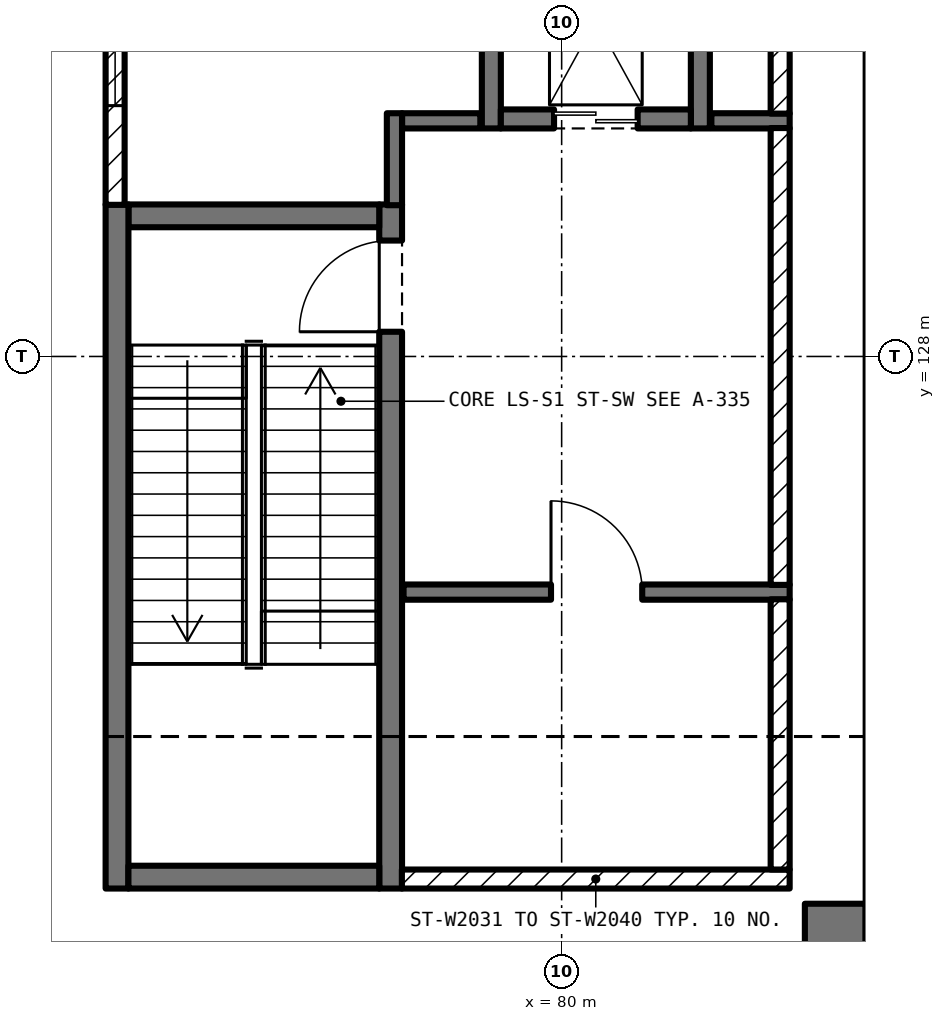
"""IFC4 building model, lengths in metres.
Left out: names, types, materials, properties, quantities, classifications, styles, units other than length and angle.
Written with IfcOpenShell. Run it as: python <this file> out.ifc"""

import sys

from ifc_helpers import new_model, si_unit, direction, frame, frame_2d, origin, place, context, subcontext, project, spatial, rectangle, extrude, element, fill, save


model = new_model("IFC4")
c1 = context("Model", 3, precision=1e-05, world=origin(), true_north=direction((0.0, 1.0)))
c2 = subcontext(c1, "Body", "Model", "MODEL_VIEW")
j1 = project(units=[si_unit("LENGTHUNIT", "METRE"), si_unit("PLANEANGLEUNIT", "RADIAN")], contexts=[c1])
p1 = place(None, origin())
s1 = spatial("IfcSite", under=j1, at=p1, CompositionType="ELEMENT")
p2 = place(p1, origin())
s2 = spatial("IfcBuilding", under=s1, at=p2, CompositionType="ELEMENT")
p3 = place(p2, frame((0.0, 0.0, 22.5)))
s3 = spatial("IfcBuildingStorey", under=s2, at=p3, CompositionType="ELEMENT", Elevation=22.5)
p4 = place(p3, frame((83.6, 95.2, 0.0), z_axis=(0.0, 0.0, 1.0), x_axis=(0.0, 1.0, 0.0)))
e1 = element("IfcWall", 1, at=p4, inside=s3, PredefinedType="SHEAR", context=c2, shape_type="SweptSolid", body=[
    extrude(rectangle(XDim=25.6, YDim=0.8, at=frame_2d((12.8, 0.0))), origin(), (0.0, 0.0, 1.0), 5.5),
])
p5 = place(p4, frame((1.1, 0.0, 2.6)))
e2 = element("IfcOpeningElement", 2, at=p5, cuts=e1, PredefinedType="OPENING", context=c2, shape_type="SweptSolid", body=[
    extrude(rectangle(XDim=2.4, YDim=1.2, at=frame_2d((1.2, 0.6))), frame((0.0, 0.412, 0.0), z_axis=(0.0, -1.0, 0.0), x_axis=(1.0, 0.0, 0.0)), (0.0, 0.0, 1.0), 0.824),
])
p6 = place(p4, frame((4.1, 0.0, 2.6)))
e3 = element("IfcOpeningElement", 3, at=p6, cuts=e1, PredefinedType="OPENING", context=c2, shape_type="SweptSolid", body=[
    extrude(rectangle(XDim=2.4, YDim=1.2, at=frame_2d((1.2, 0.6))), frame((0.0, 0.412, 0.0), z_axis=(0.0, -1.0, 0.0), x_axis=(1.0, 0.0, 0.0)), (0.0, 0.0, 1.0), 0.824),
])
p7 = place(p4, frame((7.1, 0.0, 2.6)))
e4 = element("IfcOpeningElement", 4, at=p7, cuts=e1, PredefinedType="OPENING", context=c2, shape_type="SweptSolid", body=[
    extrude(rectangle(XDim=2.4, YDim=1.2, at=frame_2d((1.2, 0.6))), frame((0.0, 0.412, 0.0), z_axis=(0.0, -1.0, 0.0), x_axis=(1.0, 0.0, 0.0)), (0.0, 0.0, 1.0), 0.824),
])
p8 = place(p4, frame((10.1, 0.0, 2.6)))
e5 = element("IfcOpeningElement", 5, at=p8, cuts=e1, PredefinedType="OPENING", context=c2, shape_type="SweptSolid", body=[
    extrude(rectangle(XDim=2.4, YDim=1.2, at=frame_2d((1.2, 0.6))), frame((0.0, 0.412, 0.0), z_axis=(0.0, -1.0, 0.0), x_axis=(1.0, 0.0, 0.0)), (0.0, 0.0, 1.0), 0.824),
])
p9 = place(p4, frame((13.1, 0.0, 2.6)))
e6 = element("IfcOpeningElement", 6, at=p9, cuts=e1, PredefinedType="OPENING", context=c2, shape_type="SweptSolid", body=[
    extrude(rectangle(XDim=2.4, YDim=1.2, at=frame_2d((1.2, 0.6))), frame((0.0, 0.412, 0.0), z_axis=(0.0, -1.0, 0.0), x_axis=(1.0, 0.0, 0.0)), (0.0, 0.0, 1.0), 0.824),
])
p10 = place(p4, frame((16.1, 0.0, 2.6)))
e7 = element("IfcOpeningElement", 7, at=p10, cuts=e1, PredefinedType="OPENING", context=c2, shape_type="SweptSolid", body=[
    extrude(rectangle(XDim=2.4, YDim=1.2, at=frame_2d((1.2, 0.6))), frame((0.0, 0.412, 0.0), z_axis=(0.0, -1.0, 0.0), x_axis=(1.0, 0.0, 0.0)), (0.0, 0.0, 1.0), 0.824),
])
p11 = place(p4, frame((19.1, 0.0, 2.6)))
e8 = element("IfcOpeningElement", 8, at=p11, cuts=e1, PredefinedType="OPENING", context=c2, shape_type="SweptSolid", body=[
    extrude(rectangle(XDim=2.4, YDim=1.2, at=frame_2d((1.2, 0.6))), frame((0.0, 0.412, 0.0), z_axis=(0.0, -1.0, 0.0), x_axis=(1.0, 0.0, 0.0)), (0.0, 0.0, 1.0), 0.824),
])
p12 = place(p4, frame((22.1, 0.0, 2.6)))
e9 = element("IfcOpeningElement", 9, at=p12, cuts=e1, PredefinedType="OPENING", context=c2, shape_type="SweptSolid", body=[
    extrude(rectangle(XDim=2.4, YDim=1.2, at=frame_2d((1.2, 0.6))), frame((0.0, 0.412, 0.0), z_axis=(0.0, -1.0, 0.0), x_axis=(1.0, 0.0, 0.0)), (0.0, 0.0, 1.0), 0.824),
])
p13 = place(p3, frame((77.75, 121.0, 0.0), z_axis=(0.0, 0.0, 1.0), x_axis=(0.0, 1.0, 0.0)))
e10 = element("IfcWall", 10, at=p13, inside=s3, PredefinedType="SOLIDWALL", context=c2, shape_type="SweptSolid", body=[
    extrude(rectangle(XDim=9.0, YDim=0.3, at=frame_2d((4.5, 0.0))), origin(), (0.0, 0.0, 1.0), 5.5),
])
p14 = place(p13, frame((7.325, 0.0, 0.0)))
e11 = element("IfcOpeningElement", 11, at=p14, cuts=e10, PredefinedType="OPENING", context=c2, shape_type="SweptSolid", body=[
    extrude(rectangle(XDim=1.2, YDim=2.1, at=frame_2d((0.6, 1.05))), frame((0.0, 0.162, 0.0), z_axis=(0.0, -1.0, 0.0), x_axis=(1.0, 0.0, 0.0)), (0.0, 0.0, 1.0), 0.324),
])
p15 = place(p3, frame((77.6, 129.85, 0.0), z_axis=(0.0, 0.0, 1.0), x_axis=(-1.0, 0.0, 0.0)))
e12 = element("IfcWall", 12, at=p15, inside=s3, PredefinedType="SOLIDWALL", context=c2, shape_type="SweptSolid", body=[
    extrude(rectangle(XDim=3.3, YDim=0.3, at=frame_2d((1.65, 0.0))), origin(), (0.0, 0.0, 1.0), 5.5),
])
p16 = place(p3, frame((74.15, 130.0, 0.0), z_axis=(0.0, 0.0, 1.0), x_axis=(0.0, -1.0, 0.0)))
e13 = element("IfcWall", 13, at=p16, inside=s3, PredefinedType="SOLIDWALL", context=c2, shape_type="SweptSolid", body=[
    extrude(rectangle(XDim=9.0, YDim=0.3, at=frame_2d((4.5, 0.0))), origin(), (0.0, 0.0, 1.0), 5.5),
])
p17 = place(p3, frame((74.3, 121.15, 0.0), z_axis=(0.0, 0.0, 1.0), x_axis=(1.0, 0.0, 0.0)))
e14 = element("IfcWall", 14, at=p17, inside=s3, PredefinedType="SOLIDWALL", context=c2, shape_type="SweptSolid", body=[
    extrude(rectangle(XDim=3.3, YDim=0.3, at=frame_2d((1.65, 0.0))), origin(), (0.0, 0.0, 1.0), 5.5),
])
for number, where, z_axis, x_axis in (
    (15, (81.825, 131.0, 0.0), (0.0, 0.0, 1.0), (0.0, 1.0, 0.0)),
    (16, (79.075, 135.0, 0.0), (0.0, 0.0, 1.0), (0.0, -1.0, 0.0)),
):
    element("IfcWall", number, at=place(p3, frame(where, z_axis=z_axis, x_axis=x_axis)), inside=s3, PredefinedType="SOLIDWALL", context=c2, shape_type="SweptSolid", body=[
        extrude(rectangle(XDim=4.0, YDim=0.25, at=frame_2d((2.0, 0.0))), origin(), (0.0, 0.0, 1.0), 5.5),
    ])
p18 = place(p3, frame((79.2, 131.125, 0.0), z_axis=(0.0, 0.0, 1.0), x_axis=(1.0, 0.0, 0.0)))
e17 = element("IfcWall", 17, at=p18, inside=s3, PredefinedType="SOLIDWALL", context=c2, shape_type="SweptSolid", body=[
    extrude(rectangle(XDim=2.5, YDim=0.25, at=frame_2d((1.25, 0.0))), origin(), (0.0, 0.0, 1.0), 5.5),
])
p19 = place(p18, frame((0.7, 0.0, 0.0)))
e18 = element("IfcOpeningElement", 18, at=p19, cuts=e17, PredefinedType="OPENING", context=c2, shape_type="SweptSolid", body=[
    extrude(rectangle(XDim=1.1, YDim=2.1, at=frame_2d((0.55, 1.05))), frame((0.0, 0.137, 0.0), z_axis=(0.0, -1.0, 0.0), x_axis=(1.0, 0.0, 0.0)), (0.0, 0.0, 1.0), 0.274),
])
for number, where, z_axis, x_axis in (
    (19, (83.0, 131.1, 0.0), (0.0, 0.0, 1.0), (-1.0, 0.0, 0.0)),
    (20, (78.93, 131.1, 0.0), (0.0, 0.0, 1.0), (-1.0, 0.0, 0.0)),
):
    element("IfcWall", number, at=place(p3, frame(where, z_axis=z_axis, x_axis=x_axis)), inside=s3, PredefinedType="PARTITIONING", context=c2, shape_type="SweptSolid", body=[
        extrude(rectangle(XDim=1.03, YDim=0.2, at=frame_2d((0.515, 0.0))), origin(), (0.0, 0.0, 1.0), 5.28),
    ])
p20 = place(p3, frame((77.8, 131.2, 0.0), z_axis=(0.0, 0.0, 1.0), x_axis=(0.0, -1.0, 0.0)))
e21 = element("IfcWall", 21, at=p20, inside=s3, PredefinedType="PARTITIONING", context=c2, shape_type="SweptSolid", body=[
    extrude(rectangle(XDim=1.21, YDim=0.2, at=frame_2d((0.605, 0.0))), origin(), (0.0, 0.0, 1.0), 5.28),
])
p21 = place(p3, frame((77.92, 124.9, 0.0), z_axis=(0.0, 0.0, 1.0), x_axis=(1.0, 0.0, 0.0)))
e22 = element("IfcWall", 22, at=p21, inside=s3, PredefinedType="PARTITIONING", context=c2, shape_type="SweptSolid", body=[
    extrude(rectangle(XDim=5.08, YDim=0.2, at=frame_2d((2.54, 0.0))), origin(), (0.0, 0.0, 1.0), 5.28),
])
p22 = place(p21, frame((1.94, 0.0, 0.0)))
e23 = element("IfcOpeningElement", 23, at=p22, cuts=e22, PredefinedType="OPENING", context=c2, shape_type="SweptSolid", body=[
    extrude(rectangle(XDim=1.2, YDim=2.1, at=frame_2d((0.6, 1.05))), frame((0.0, 0.112, 0.0), z_axis=(0.0, -1.0, 0.0), x_axis=(1.0, 0.0, 0.0)), (0.0, 0.0, 1.0), 0.224),
])
p23 = place(p3, frame((74.125, 134.75, 0.0), z_axis=(0.0, 0.0, 1.0), x_axis=(0.0, -1.0, 0.0)))
e24 = element("IfcWall", 24, at=p23, inside=s3, PredefinedType="SOLIDWALL", context=c2, shape_type="SweptSolid", body=[
    extrude(rectangle(XDim=4.755, YDim=0.25, at=frame_2d((2.377, 0.0))), origin(), (0.0, 0.0, 1.0), 5.28),
])
p24 = place(p23, frame((1.05, 0.0, 2.6)))
e25 = element("IfcOpeningElement", 25, at=p24, cuts=e24, PredefinedType="OPENING", context=c2, shape_type="SweptSolid", body=[
    extrude(rectangle(XDim=2.4, YDim=1.2, at=frame_2d((1.2, 0.6))), frame((0.0, 0.137, 0.0), z_axis=(0.0, -1.0, 0.0), x_axis=(1.0, 0.0, 0.0)), (0.0, 0.0, 1.0), 0.274),
])
p25 = place(p3, frame((77.898, 121.125, 0.0), z_axis=(0.0, 0.0, 1.0), x_axis=(1.0, 0.0, 0.0)))
e26 = element("IfcWall", 26, at=p25, inside=s3, PredefinedType="SOLIDWALL", context=c2, shape_type="SweptSolid", body=[
    extrude(rectangle(XDim=5.102, YDim=0.25, at=frame_2d((2.551, 0.0))), origin(), (0.0, 0.0, 1.0), 5.28),
])
p26 = place(p3, frame((82.875, 121.25, 0.0), z_axis=(0.0, 0.0, 1.0), x_axis=(0.0, 1.0, 0.0)))
e27 = element("IfcWall", 27, at=p26, inside=s3, PredefinedType="SOLIDWALL", context=c2, shape_type="SweptSolid", body=[
    extrude(rectangle(XDim=3.555, YDim=0.25, at=frame_2d((1.777, 0.0))), origin(), (0.0, 0.0, 1.0), 5.28),
])
p27 = place(p3, frame((82.875, 124.995, 0.0), z_axis=(0.0, 0.0, 1.0), x_axis=(0.0, 1.0, 0.0)))
e28 = element("IfcWall", 28, at=p27, inside=s3, PredefinedType="SOLIDWALL", context=c2, shape_type="SweptSolid", body=[
    extrude(rectangle(XDim=6.01, YDim=0.25, at=frame_2d((3.005, 0.0))), origin(), (0.0, 0.0, 1.0), 5.28),
])
p28 = place(p3, frame((82.875, 131.195, 0.0), z_axis=(0.0, 0.0, 1.0), x_axis=(0.0, 1.0, 0.0)))
e29 = element("IfcWall", 29, at=p28, inside=s3, PredefinedType="SOLIDWALL", context=c2, shape_type="SweptSolid", body=[
    extrude(rectangle(XDim=3.805, YDim=0.25, at=frame_2d((1.902, 0.0))), origin(), (0.0, 0.0, 1.0), 5.28),
])
p29 = place(p14, origin())
e30 = element("IfcDoor", 30, at=p29, inside=s3, OperationType="SINGLE_SWING_LEFT", PredefinedType="DOOR", context=c2, shape_type="SweptSolid", body=[
    extrude(rectangle(XDim=1.2, YDim=2.1, at=frame_2d((0.6, 1.05))), frame((0.0, 0.025, 0.0), z_axis=(0.0, -1.0, 0.0), x_axis=(1.0, 0.0, 0.0)), (0.0, 0.0, 1.0), 0.05),
])
fill(e11, e30)
p30 = place(p19, origin())
e31 = element("IfcDoor", 31, at=p30, inside=s3, OperationType="DOUBLE_DOOR_SLIDING", PredefinedType="DOOR", context=c2, shape_type="SweptSolid", body=[
    extrude(rectangle(XDim=1.1, YDim=2.1, at=frame_2d((0.55, 1.05))), frame((0.0, 0.025, 0.0), z_axis=(0.0, -1.0, 0.0), x_axis=(1.0, 0.0, 0.0)), (0.0, 0.0, 1.0), 0.05),
])
fill(e18, e31)
p31 = place(p22, origin())
e32 = element("IfcDoor", 32, at=p31, inside=s3, OperationType="SINGLE_SWING_LEFT", PredefinedType="DOOR", context=c2, shape_type="SweptSolid", body=[
    extrude(rectangle(XDim=1.2, YDim=2.1, at=frame_2d((0.6, 1.05))), frame((0.0, 0.025, 0.0), z_axis=(0.0, -1.0, 0.0), x_axis=(1.0, 0.0, 0.0)), (0.0, 0.0, 1.0), 0.05),
])
fill(e23, e32)
p32 = place(p24, origin())
e33 = element("IfcWindow", 33, at=p32, inside=s3, PartitioningType="SINGLE_PANEL", PredefinedType="WINDOW", context=c2, shape_type="SweptSolid", body=[
    extrude(rectangle(XDim=2.4, YDim=1.2, at=frame_2d((1.2, 0.6))), frame((0.0, 0.03, 0.0), z_axis=(0.0, -1.0, 0.0), x_axis=(1.0, 0.0, 0.0)), (0.0, 0.0, 1.0), 0.06),
])
fill(e25, e33)
save(model, sys.argv[1])
